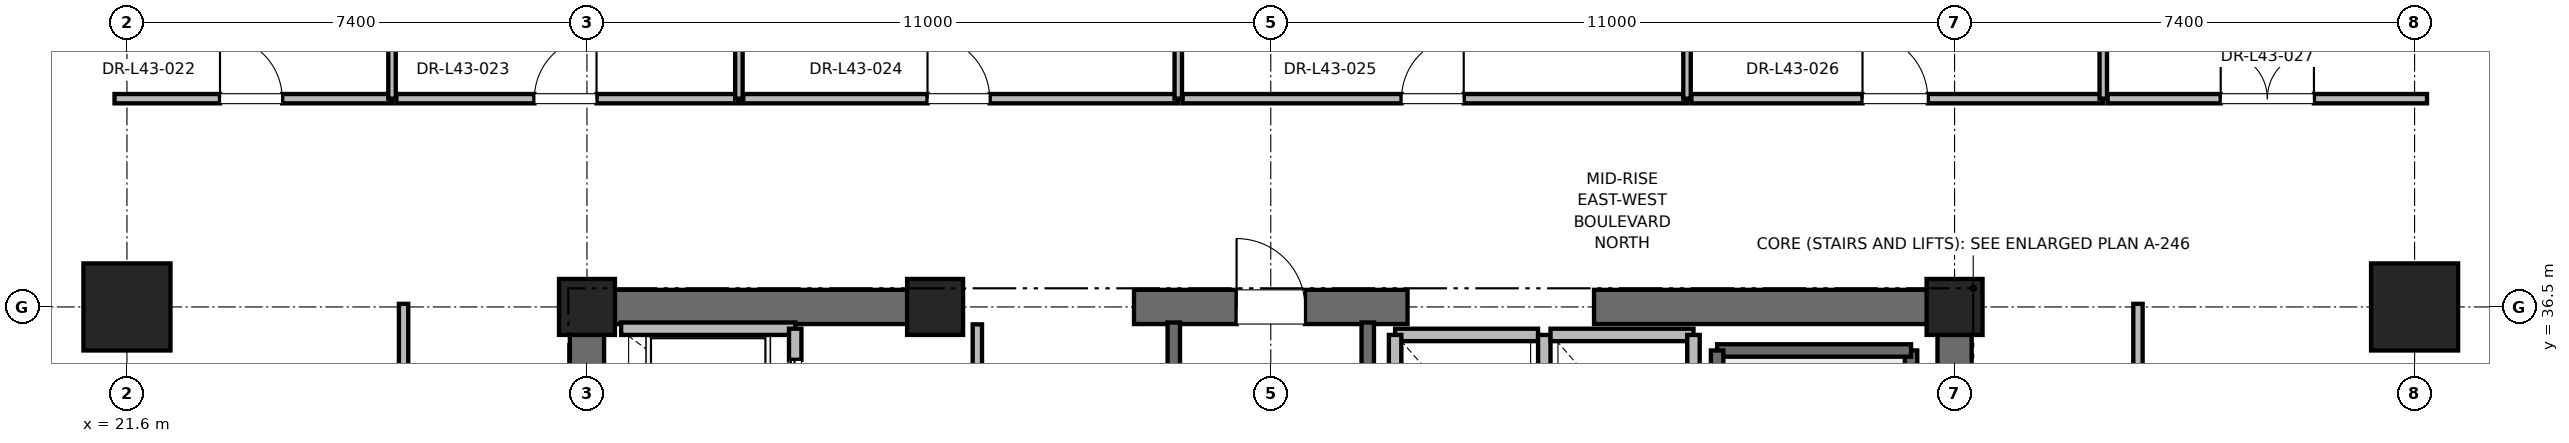
"""IFC4 building model, lengths in metres.
Left out: names, types, materials, properties, quantities, classifications, styles, units other than length and angle.
Written with IfcOpenShell. Run it as: python <this file> out.ifc"""

import sys

from ifc_helpers import new_model, si_unit, direction, frame, frame_2d, origin, origin_2d, place, context, subcontext, project, spatial, rectangle, extrude, element, fill, save


model = new_model("IFC4")
c1 = context("Model", 3, precision=1e-05, world=origin(), true_north=direction((0.0, 1.0)))
c2 = subcontext(c1, "Body", "Model", "MODEL_VIEW")
j1 = project(units=[si_unit("LENGTHUNIT", "METRE"), si_unit("PLANEANGLEUNIT", "RADIAN")], contexts=[c1])
p1 = place(None, origin())
s1 = spatial("IfcSite", under=j1, at=p1, CompositionType="ELEMENT")
p2 = place(p1, origin())
s2 = spatial("IfcBuilding", under=s1, at=p2, CompositionType="ELEMENT")
p3 = place(p2, frame((0.0, 0.0, 184.4)))
s3 = spatial("IfcBuildingStorey", under=s2, at=p3, CompositionType="ELEMENT", Elevation=184.4)
for number, where, z_axis, x_axis in (
    (1, (21.6, 36.5, 0.0), (0.0, 0.0, 1.0), (1.0, 0.0, 0.0)),
    (2, (58.4, 36.5, 0.0), (0.0, 0.0, 1.0), (1.0, 0.0, 0.0)),
):
    element("IfcColumn", number, at=place(p3, frame(where, z_axis=z_axis, x_axis=x_axis)), inside=s3, PredefinedType="COLUMN", context=c2, shape_type="SweptSolid", body=[
        extrude(rectangle(XDim=1.4, YDim=1.4, at=origin_2d()), origin(), (0.0, 0.0, 1.0), 5.0),
    ])
for number, where, z_axis, x_axis in (
    (3, (29.0, 36.5, 0.0), (0.0, 0.0, 1.0), (1.0, 0.0, 0.0)),
    (4, (51.0, 36.5, 0.0), (0.0, 0.0, 1.0), (1.0, 0.0, 0.0)),
    (5, (34.6, 36.5, 0.0), (0.0, 0.0, 1.0), (1.0, 0.0, 0.0)),
):
    element("IfcColumn", number, at=place(p3, frame(where, z_axis=z_axis, x_axis=x_axis)), inside=s3, PredefinedType="PILASTER", context=c2, shape_type="SweptSolid", body=[
        extrude(rectangle(XDim=0.9, YDim=0.9, at=origin_2d()), origin(), (0.0, 0.0, 1.0), 5.0),
    ])
p4 = place(p3, frame((29.0, 36.5, 0.0), z_axis=(0.0, 0.0, 1.0), x_axis=(1.0, 0.0, 0.0)))
e6 = element("IfcWall", 6, at=p4, inside=s3, PredefinedType="SHEAR", context=c2, shape_type="SweptSolid", body=[
    extrude(rectangle(XDim=5.8, YDim=0.55, at=frame_2d((2.9, 0.0))), origin(), (0.0, 0.0, 1.0), 4.7),
])
p5 = place(p3, frame((37.8, 36.5, 0.0), z_axis=(0.0, 0.0, 1.0), x_axis=(1.0, 0.0, 0.0)))
e7 = element("IfcWall", 7, at=p5, inside=s3, PredefinedType="SHEAR", context=c2, shape_type="SweptSolid", body=[
    extrude(rectangle(XDim=4.4, YDim=0.55, at=frame_2d((2.2, 0.0))), origin(), (0.0, 0.0, 1.0), 4.7),
])
p6 = place(p5, frame((1.65, 0.0, 0.0)))
e8 = element("IfcOpeningElement", 8, at=p6, cuts=e7, PredefinedType="OPENING", context=c2, shape_type="SweptSolid", body=[
    extrude(rectangle(XDim=1.1, YDim=2.15, at=frame_2d((0.55, 1.075))), frame((0.0, 0.275, 0.0), z_axis=(0.0, -1.0, 0.0), x_axis=(1.0, 0.0, 0.0)), (0.0, 0.0, 1.0), 0.55),
])
for number, where, z_axis, x_axis in (
    (9, (45.2, 36.5, 0.0), (0.0, 0.0, 1.0), (1.0, 0.0, 0.0)),
    (10, (29.0, 30.7, 0.0), (0.0, 0.0, 1.0), (0.0, 1.0, 0.0)),
):
    element("IfcWall", number, at=place(p3, frame(where, z_axis=z_axis, x_axis=x_axis)), inside=s3, PredefinedType="SHEAR", context=c2, shape_type="SweptSolid", body=[
        extrude(rectangle(XDim=5.8, YDim=0.55, at=frame_2d((2.9, 0.0))), origin(), (0.0, 0.0, 1.0), 4.7),
    ])
p7 = place(p3, frame((51.0, 27.7, 0.0), z_axis=(0.0, 0.0, 1.0), x_axis=(0.0, 1.0, 0.0)))
e11 = element("IfcWall", 11, at=p7, inside=s3, PredefinedType="SHEAR", context=c2, shape_type="SweptSolid", body=[
    extrude(rectangle(XDim=8.8, YDim=0.55, at=frame_2d((4.4, 0.0))), origin(), (0.0, 0.0, 1.0), 4.7),
])
p8 = place(p3, frame((50.3, 27.65, 0.0), z_axis=(0.0, 0.0, 1.0), x_axis=(0.0, 1.0, 0.0)))
e12 = element("IfcWall", 12, at=p8, inside=s3, PredefinedType="SOLIDWALL", context=c2, shape_type="SweptSolid", body=[
    extrude(rectangle(XDim=8.15, YDim=0.2, at=frame_2d((4.075, 0.0))), origin(), (0.0, 0.0, 1.0), 4.7),
])
p9 = place(p3, frame((47.18, 35.8, 0.0), z_axis=(0.0, 0.0, 1.0), x_axis=(1.0, 0.0, 0.0)))
e13 = element("IfcWall", 13, at=p9, inside=s3, PredefinedType="SOLIDWALL", context=c2, shape_type="SweptSolid", body=[
    extrude(rectangle(XDim=3.12, YDim=0.2, at=frame_2d((1.56, 0.0))), origin(), (0.0, 0.0, 1.0), 4.7),
])
p10 = place(p3, frame((47.18, 27.62, 0.0), z_axis=(0.0, 0.0, 1.0), x_axis=(0.0, 1.0, 0.0)))
e14 = element("IfcWall", 14, at=p10, inside=s3, PredefinedType="SOLIDWALL", context=c2, shape_type="SweptSolid", body=[
    extrude(rectangle(XDim=8.18, YDim=0.2, at=frame_2d((4.09, 0.0))), origin(), (0.0, 0.0, 1.0), 4.7),
])
p11 = place(p3, frame((38.44, 27.38, 0.0), z_axis=(0.0, 0.0, 1.0), x_axis=(0.0, 1.0, 0.0)))
e15 = element("IfcWall", 15, at=p11, inside=s3, PredefinedType="SOLIDWALL", context=c2, shape_type="SweptSolid", body=[
    extrude(rectangle(XDim=8.87, YDim=0.2, at=frame_2d((4.435, 0.0))), origin(), (0.0, 0.0, 1.0), 4.7),
])
p12 = place(p3, frame((41.56, 27.68, 0.0), z_axis=(0.0, 0.0, 1.0), x_axis=(0.0, 1.0, 0.0)))
e16 = element("IfcWall", 16, at=p12, inside=s3, PredefinedType="SOLIDWALL", context=c2, shape_type="SweptSolid", body=[
    extrude(rectangle(XDim=8.57, YDim=0.2, at=frame_2d((4.285, 0.0))), origin(), (0.0, 0.0, 1.0), 4.7),
])
p13 = place(p3, frame((32.35, 36.15, 0.0), z_axis=(0.0, 0.0, 1.0), x_axis=(-1.0, 0.0, 0.0)))
e17 = element("IfcWall", 17, at=p13, inside=s3, PredefinedType="SOLIDWALL", context=c2, shape_type="SweptSolid", body=[
    extrude(rectangle(XDim=2.8, YDim=0.2, at=frame_2d((1.4, 0.0))), origin(), (0.0, 0.0, 1.0), 3.753),
])
p14 = place(p3, frame((32.35, 34.05, 0.0), z_axis=(0.0, 0.0, 1.0), x_axis=(0.0, 1.0, 0.0)))
e18 = element("IfcWall", 18, at=p14, inside=s3, PredefinedType="SOLIDWALL", context=c2, shape_type="SweptSolid", body=[
    extrude(rectangle(XDim=2.1, YDim=0.2, at=frame_2d((1.05, 0.0))), origin(), (0.0, 0.0, 1.0), 4.7),
])
p15 = place(p14, frame((0.5, 0.0, 0.0)))
e19 = element("IfcOpeningElement", 19, at=p15, cuts=e18, PredefinedType="OPENING", context=c2, shape_type="SweptSolid", body=[
    extrude(rectangle(XDim=1.1, YDim=2.2, at=frame_2d((0.55, 1.1))), frame((0.0, 0.1, 0.0), z_axis=(0.0, -1.0, 0.0), x_axis=(1.0, 0.0, 0.0)), (0.0, 0.0, 1.0), 0.2),
])
p16 = place(p3, frame((44.3, 36.05, 0.0), z_axis=(0.0, 0.0, 1.0), x_axis=(-1.0, 0.0, 0.0)))
e20 = element("IfcWall", 20, at=p16, inside=s3, PredefinedType="SOLIDWALL", context=c2, shape_type="SweptSolid", body=[
    extrude(rectangle(XDim=2.3, YDim=0.2, at=frame_2d((1.15, 0.0))), origin(), (0.0, 0.0, 1.0), 3.68),
])
for number, where, z_axis, x_axis in (
    (21, (42.0, 36.05, 0.0), (0.0, 0.0, 1.0), (0.0, -1.0, 0.0)),
    (22, (44.4, 33.45, 0.0), (0.0, 0.0, 1.0), (0.0, 1.0, 0.0)),
):
    element("IfcWall", number, at=place(p3, frame(where, z_axis=z_axis, x_axis=x_axis)), inside=s3, PredefinedType="SOLIDWALL", context=c2, shape_type="SweptSolid", body=[
        extrude(rectangle(XDim=2.6, YDim=0.2, at=frame_2d((1.3, 0.0))), origin(), (0.0, 0.0, 1.0), 3.68),
    ])
p17 = place(p3, frame((46.8, 36.05, 0.0), z_axis=(0.0, 0.0, 1.0), x_axis=(-1.0, 0.0, 0.0)))
e23 = element("IfcWall", 23, at=p17, inside=s3, PredefinedType="SOLIDWALL", context=c2, shape_type="SweptSolid", body=[
    extrude(rectangle(XDim=2.3, YDim=0.2, at=frame_2d((1.15, 0.0))), origin(), (0.0, 0.0, 1.0), 3.68),
])
p18 = place(p3, frame((46.8, 33.45, 0.0), z_axis=(0.0, 0.0, 1.0), x_axis=(0.0, 1.0, 0.0)))
e24 = element("IfcWall", 24, at=p18, inside=s3, PredefinedType="SOLIDWALL", context=c2, shape_type="SweptSolid", body=[
    extrude(rectangle(XDim=2.6, YDim=0.2, at=frame_2d((1.3, 0.0))), origin(), (0.0, 0.0, 1.0), 4.7),
])
p19 = place(p3, frame((35.28, 33.95, 0.0), z_axis=(0.0, 0.0, 1.0), x_axis=(0.0, 1.0, 0.0)))
e25 = element("IfcWall", 25, at=p19, inside=s3, PredefinedType="PARTITIONING", context=c2, shape_type="SweptSolid", body=[
    extrude(rectangle(XDim=2.27, YDim=0.15, at=frame_2d((1.135, 0.0))), origin(), (0.0, 0.0, 1.0), 2.85),
])
p20 = place(p19, frame((0.66, 0.0, 0.0)))
e26 = element("IfcOpeningElement", 26, at=p20, cuts=e25, PredefinedType="OPENING", context=c2, shape_type="SweptSolid", body=[
    extrude(rectangle(XDim=0.95, YDim=2.15, at=frame_2d((0.475, 1.075))), frame((0.0, 0.075, 0.0), z_axis=(0.0, -1.0, 0.0), x_axis=(1.0, 0.0, 0.0)), (0.0, 0.0, 1.0), 0.15),
])
p21 = place(p3, frame((21.4, 39.85, 0.0), z_axis=(0.0, 0.0, 1.0), x_axis=(1.0, 0.0, 0.0)))
e27 = element("IfcWall", 27, at=p21, inside=s3, PredefinedType="PARTITIONING", context=c2, shape_type="SweptSolid", body=[
    extrude(rectangle(XDim=4.464, YDim=0.15, at=frame_2d((2.232, 0.0))), origin(), (0.0, 0.0, 1.0), 2.85),
])
p22 = place(p21, frame((1.697, 0.0, 0.0)))
e28 = element("IfcOpeningElement", 28, at=p22, cuts=e27, PredefinedType="OPENING", context=c2, shape_type="SweptSolid", body=[
    extrude(rectangle(XDim=1.0, YDim=2.15, at=frame_2d((0.5, 1.075))), frame((0.0, 0.075, 0.0), z_axis=(0.0, -1.0, 0.0), x_axis=(1.0, 0.0, 0.0)), (0.0, 0.0, 1.0), 0.15),
])
p23 = place(p3, frame((25.864, 39.85, 0.0), z_axis=(0.0, 0.0, 1.0), x_axis=(0.0, 1.0, 0.0)))
e29 = element("IfcWall", 29, at=p23, inside=s3, PredefinedType="PARTITIONING", context=c2, shape_type="SweptSolid", body=[
    extrude(rectangle(XDim=7.75, YDim=0.12, at=frame_2d((3.875, 0.0))), origin(), (0.0, 0.0, 1.0), 2.85),
])
p24 = place(p3, frame((25.934, 39.85, 0.0), z_axis=(0.0, 0.0, 1.0), x_axis=(1.0, 0.0, 0.0)))
e30 = element("IfcWall", 30, at=p24, inside=s3, PredefinedType="PARTITIONING", context=c2, shape_type="SweptSolid", body=[
    extrude(rectangle(XDim=5.51, YDim=0.15, at=frame_2d((2.755, 0.0))), origin(), (0.0, 0.0, 1.0), 2.85),
])
p25 = place(p24, frame((2.22, 0.0, 0.0)))
e31 = element("IfcOpeningElement", 31, at=p25, cuts=e30, PredefinedType="OPENING", context=c2, shape_type="SweptSolid", body=[
    extrude(rectangle(XDim=1.0, YDim=2.15, at=frame_2d((0.5, 1.075))), frame((0.0, 0.075, 0.0), z_axis=(0.0, -1.0, 0.0), x_axis=(1.0, 0.0, 0.0)), (0.0, 0.0, 1.0), 0.15),
])
p26 = place(p3, frame((31.444, 39.85, 0.0), z_axis=(0.0, 0.0, 1.0), x_axis=(0.0, 1.0, 0.0)))
e32 = element("IfcWall", 32, at=p26, inside=s3, PredefinedType="PARTITIONING", context=c2, shape_type="SweptSolid", body=[
    extrude(rectangle(XDim=7.75, YDim=0.12, at=frame_2d((3.875, 0.0))), origin(), (0.0, 0.0, 1.0), 2.85),
])
p27 = place(p3, frame((31.514, 39.85, 0.0), z_axis=(0.0, 0.0, 1.0), x_axis=(1.0, 0.0, 0.0)))
e33 = element("IfcWall", 33, at=p27, inside=s3, PredefinedType="PARTITIONING", context=c2, shape_type="SweptSolid", body=[
    extrude(rectangle(XDim=6.998, YDim=0.15, at=frame_2d((3.499, 0.0))), origin(), (0.0, 0.0, 1.0), 2.85),
])
p28 = place(p27, frame((2.964, 0.0, 0.0)))
e34 = element("IfcOpeningElement", 34, at=p28, cuts=e33, PredefinedType="OPENING", context=c2, shape_type="SweptSolid", body=[
    extrude(rectangle(XDim=1.0, YDim=2.15, at=frame_2d((0.5, 1.075))), frame((0.0, 0.075, 0.0), z_axis=(0.0, -1.0, 0.0), x_axis=(1.0, 0.0, 0.0)), (0.0, 0.0, 1.0), 0.15),
])
p29 = place(p3, frame((38.512, 39.85, 0.0), z_axis=(0.0, 0.0, 1.0), x_axis=(0.0, 1.0, 0.0)))
e35 = element("IfcWall", 35, at=p29, inside=s3, PredefinedType="PARTITIONING", context=c2, shape_type="SweptSolid", body=[
    extrude(rectangle(XDim=7.75, YDim=0.12, at=frame_2d((3.875, 0.0))), origin(), (0.0, 0.0, 1.0), 2.85),
])
p30 = place(p3, frame((38.582, 39.85, 0.0), z_axis=(0.0, 0.0, 1.0), x_axis=(1.0, 0.0, 0.0)))
e36 = element("IfcWall", 36, at=p30, inside=s3, PredefinedType="PARTITIONING", context=c2, shape_type="SweptSolid", body=[
    extrude(rectangle(XDim=8.114, YDim=0.15, at=frame_2d((4.057, 0.0))), origin(), (0.0, 0.0, 1.0), 2.85),
])
p31 = place(p30, frame((3.522, 0.0, 0.0)))
e37 = element("IfcOpeningElement", 37, at=p31, cuts=e36, PredefinedType="OPENING", context=c2, shape_type="SweptSolid", body=[
    extrude(rectangle(XDim=1.0, YDim=2.15, at=frame_2d((0.5, 1.075))), frame((0.0, 0.075, 0.0), z_axis=(0.0, -1.0, 0.0), x_axis=(1.0, 0.0, 0.0)), (0.0, 0.0, 1.0), 0.15),
])
p32 = place(p3, frame((46.696, 39.85, 0.0), z_axis=(0.0, 0.0, 1.0), x_axis=(0.0, 1.0, 0.0)))
e38 = element("IfcWall", 38, at=p32, inside=s3, PredefinedType="PARTITIONING", context=c2, shape_type="SweptSolid", body=[
    extrude(rectangle(XDim=7.75, YDim=0.12, at=frame_2d((3.875, 0.0))), origin(), (0.0, 0.0, 1.0), 2.85),
])
p33 = place(p3, frame((46.766, 39.85, 0.0), z_axis=(0.0, 0.0, 1.0), x_axis=(1.0, 0.0, 0.0)))
e39 = element("IfcWall", 39, at=p33, inside=s3, PredefinedType="PARTITIONING", context=c2, shape_type="SweptSolid", body=[
    extrude(rectangle(XDim=6.626, YDim=0.15, at=frame_2d((3.313, 0.0))), origin(), (0.0, 0.0, 1.0), 2.85),
])
p34 = place(p33, frame((2.753, 0.0, 0.0)))
e40 = element("IfcOpeningElement", 40, at=p34, cuts=e39, PredefinedType="OPENING", context=c2, shape_type="SweptSolid", body=[
    extrude(rectangle(XDim=1.05, YDim=2.2, at=frame_2d((0.525, 1.1))), frame((0.0, 0.075, 0.0), z_axis=(0.0, -1.0, 0.0), x_axis=(1.0, 0.0, 0.0)), (0.0, 0.0, 1.0), 0.15),
])
p35 = place(p3, frame((53.392, 39.85, 0.0), z_axis=(0.0, 0.0, 1.0), x_axis=(0.0, 1.0, 0.0)))
e41 = element("IfcWall", 41, at=p35, inside=s3, PredefinedType="PARTITIONING", context=c2, shape_type="SweptSolid", body=[
    extrude(rectangle(XDim=7.75, YDim=0.12, at=frame_2d((3.875, 0.0))), origin(), (0.0, 0.0, 1.0), 2.85),
])
p36 = place(p3, frame((53.462, 39.85, 0.0), z_axis=(0.0, 0.0, 1.0), x_axis=(1.0, 0.0, 0.0)))
e42 = element("IfcWall", 42, at=p36, inside=s3, PredefinedType="PARTITIONING", context=c2, shape_type="SweptSolid", body=[
    extrude(rectangle(XDim=5.138, YDim=0.15, at=frame_2d((2.569, 0.0))), origin(), (0.0, 0.0, 1.0), 2.85),
])
p37 = place(p36, frame((1.819, 0.0, 0.0)))
e43 = element("IfcOpeningElement", 43, at=p37, cuts=e42, PredefinedType="OPENING", context=c2, shape_type="SweptSolid", body=[
    extrude(rectangle(XDim=1.5, YDim=2.25, at=frame_2d((0.75, 1.125))), frame((0.0, 0.075, 0.0), z_axis=(0.0, -1.0, 0.0), x_axis=(1.0, 0.0, 0.0)), (0.0, 0.0, 1.0), 0.15),
])
p38 = place(p3, frame((26.05, 30.647, 0.0), z_axis=(0.0, 0.0, 1.0), x_axis=(0.0, 1.0, 0.0)))
e44 = element("IfcWall", 44, at=p38, inside=s3, PredefinedType="PARTITIONING", context=c2, shape_type="SweptSolid", body=[
    extrude(rectangle(XDim=5.903, YDim=0.15, at=frame_2d((2.952, 0.0))), origin(), (0.0, 0.0, 1.0), 2.85),
])
p39 = place(p38, frame((2.126, 0.0, 0.0)))
e45 = element("IfcOpeningElement", 45, at=p39, cuts=e44, PredefinedType="OPENING", context=c2, shape_type="SweptSolid", body=[
    extrude(rectangle(XDim=1.5, YDim=2.25, at=frame_2d((0.75, 1.125))), frame((0.0, 0.075, 0.0), z_axis=(0.0, -1.0, 0.0), x_axis=(1.0, 0.0, 0.0)), (0.0, 0.0, 1.0), 0.15),
])
p40 = place(p3, frame((53.95, 32.819, 0.0), z_axis=(0.0, 0.0, 1.0), x_axis=(0.0, 1.0, 0.0)))
e46 = element("IfcWall", 46, at=p40, inside=s3, PredefinedType="PARTITIONING", context=c2, shape_type="SweptSolid", body=[
    extrude(rectangle(XDim=3.731, YDim=0.15, at=frame_2d((1.865, 0.0))), origin(), (0.0, 0.0, 1.0), 2.85),
])
p41 = place(p40, frame((1.291, 0.0, 0.0)))
e47 = element("IfcOpeningElement", 47, at=p41, cuts=e46, PredefinedType="OPENING", context=c2, shape_type="SweptSolid", body=[
    extrude(rectangle(XDim=1.0, YDim=2.15, at=frame_2d((0.5, 1.075))), frame((0.0, 0.075, 0.0), z_axis=(0.0, -1.0, 0.0), x_axis=(1.0, 0.0, 0.0)), (0.0, 0.0, 1.0), 0.15),
])
p42 = place(p6, origin())
e48 = element("IfcDoor", 48, at=p42, inside=s3, OperationType="SINGLE_SWING_LEFT", PredefinedType="DOOR", context=c2, shape_type="SweptSolid", body=[
    extrude(rectangle(XDim=1.1, YDim=2.15, at=frame_2d((0.55, 1.075))), frame((0.0, 0.025, 0.0), z_axis=(0.0, -1.0, 0.0), x_axis=(1.0, 0.0, 0.0)), (0.0, 0.0, 1.0), 0.05),
])
fill(e8, e48)
p43 = place(p15, origin())
e49 = element("IfcDoor", 49, at=p43, inside=s3, OperationType="SLIDING_TO_RIGHT", PredefinedType="DOOR", context=c2, shape_type="SweptSolid", body=[
    extrude(rectangle(XDim=1.1, YDim=2.2, at=frame_2d((0.55, 1.1))), frame((0.0, 0.025, 0.0), z_axis=(0.0, -1.0, 0.0), x_axis=(1.0, 0.0, 0.0)), (0.0, 0.0, 1.0), 0.05),
])
fill(e19, e49)
p44 = place(p22, origin())
e50 = element("IfcDoor", 50, at=p44, inside=s3, OperationType="SINGLE_SWING_LEFT", PredefinedType="DOOR", context=c2, shape_type="SweptSolid", body=[
    extrude(rectangle(XDim=1.0, YDim=2.15, at=frame_2d((0.5, 1.075))), frame((0.0, 0.025, 0.0), z_axis=(0.0, -1.0, 0.0), x_axis=(1.0, 0.0, 0.0)), (0.0, 0.0, 1.0), 0.05),
])
fill(e28, e50)
p45 = place(p25, origin())
e51 = element("IfcDoor", 51, at=p45, inside=s3, OperationType="SINGLE_SWING_RIGHT", PredefinedType="DOOR", context=c2, shape_type="SweptSolid", body=[
    extrude(rectangle(XDim=1.0, YDim=2.15, at=frame_2d((0.5, 1.075))), frame((0.0, 0.025, 0.0), z_axis=(0.0, -1.0, 0.0), x_axis=(1.0, 0.0, 0.0)), (0.0, 0.0, 1.0), 0.05),
])
fill(e31, e51)
p46 = place(p28, origin())
e52 = element("IfcDoor", 52, at=p46, inside=s3, OperationType="SINGLE_SWING_LEFT", PredefinedType="DOOR", context=c2, shape_type="SweptSolid", body=[
    extrude(rectangle(XDim=1.0, YDim=2.15, at=frame_2d((0.5, 1.075))), frame((0.0, 0.025, 0.0), z_axis=(0.0, -1.0, 0.0), x_axis=(1.0, 0.0, 0.0)), (0.0, 0.0, 1.0), 0.05),
])
fill(e34, e52)
p47 = place(p31, origin())
e53 = element("IfcDoor", 53, at=p47, inside=s3, OperationType="SINGLE_SWING_RIGHT", PredefinedType="DOOR", context=c2, shape_type="SweptSolid", body=[
    extrude(rectangle(XDim=1.0, YDim=2.15, at=frame_2d((0.5, 1.075))), frame((0.0, 0.025, 0.0), z_axis=(0.0, -1.0, 0.0), x_axis=(1.0, 0.0, 0.0)), (0.0, 0.0, 1.0), 0.05),
])
fill(e37, e53)
p48 = place(p34, origin())
e54 = element("IfcDoor", 54, at=p48, inside=s3, OperationType="SINGLE_SWING_LEFT", PredefinedType="DOOR", context=c2, shape_type="SweptSolid", body=[
    extrude(rectangle(XDim=1.05, YDim=2.2, at=frame_2d((0.525, 1.1))), frame((0.0, 0.025, 0.0), z_axis=(0.0, -1.0, 0.0), x_axis=(1.0, 0.0, 0.0)), (0.0, 0.0, 1.0), 0.05),
])
fill(e40, e54)
p49 = place(p37, origin())
e55 = element("IfcDoor", 55, at=p49, inside=s3, OperationType="DOUBLE_DOOR_SINGLE_SWING", PredefinedType="DOOR", context=c2, shape_type="SweptSolid", body=[
    extrude(rectangle(XDim=1.5, YDim=2.25, at=frame_2d((0.75, 1.125))), frame((0.0, 0.025, 0.0), z_axis=(0.0, -1.0, 0.0), x_axis=(1.0, 0.0, 0.0)), (0.0, 0.0, 1.0), 0.05),
])
fill(e43, e55)
save(model, sys.argv[1])
